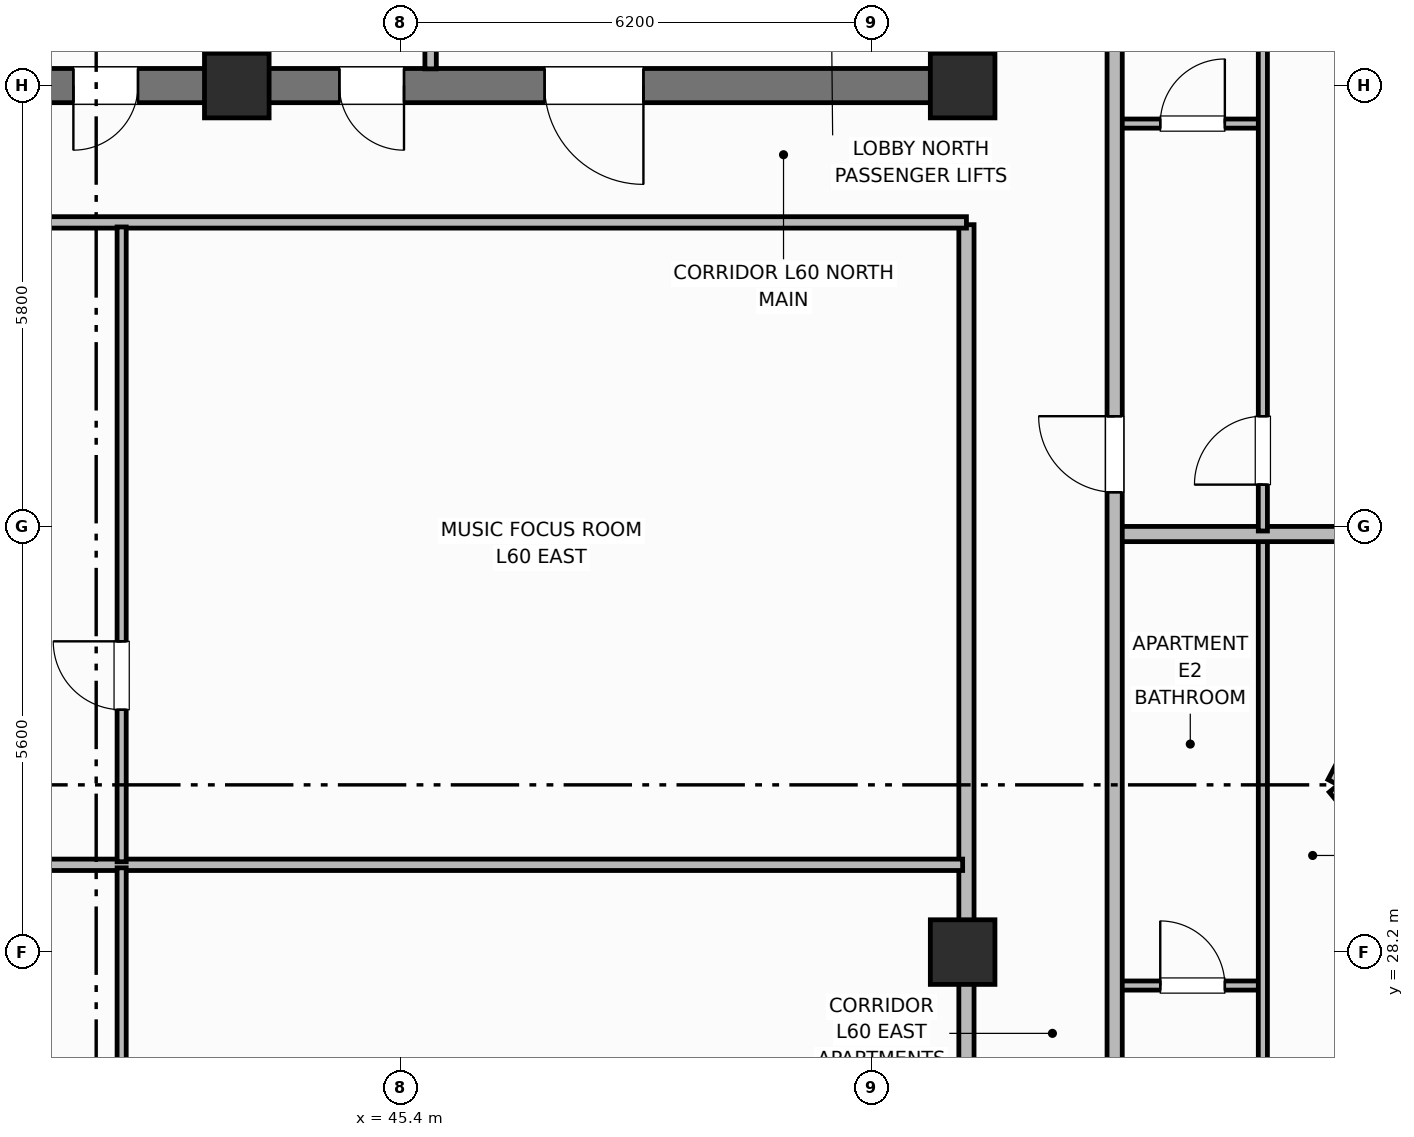
"""IFC4 building model, lengths in metres.
Left out: names, types, materials, properties, quantities, classifications, styles, units other than length and angle.
Written with IfcOpenShell. Run it as: python <this file> out.ifc"""

import sys

from ifc_helpers import new_model, si_unit, direction, frame, frame_2d, origin, origin_2d, place, context, subcontext, project, spatial, rectangle, extrude, element, fill, save


model = new_model("IFC4")
c1 = context("Model", 3, precision=1e-05, world=origin(), true_north=direction((0.0, 1.0)))
c2 = subcontext(c1, "Body", "Model", "MODEL_VIEW")
j1 = project(units=[si_unit("LENGTHUNIT", "METRE"), si_unit("PLANEANGLEUNIT", "RADIAN")], contexts=[c1])
p1 = place(None, origin())
s1 = spatial("IfcSite", under=j1, at=p1, CompositionType="ELEMENT")
p2 = place(p1, origin())
s2 = spatial("IfcBuilding", under=s1, at=p2, CompositionType="ELEMENT")
p3 = place(p2, frame((0.0, 0.0, 240.6)))
s3 = spatial("IfcBuildingStorey", under=s2, at=p3, CompositionType="ELEMENT", Elevation=240.6)
p4 = place(p3, frame((52.8, 39.825, 0.0), z_axis=(0.0, 0.0, 1.0), x_axis=(0.0, 1.0, 0.0)))
e1 = element("IfcWall", 1, at=p4, inside=s3, PredefinedType="SHEAR", context=c2, shape_type="SweptSolid", body=[
    extrude(rectangle(XDim=5.75, YDim=0.45, at=frame_2d((2.875, 0.0))), origin(), (0.0, 0.0, 1.0), 3.7),
])
p5 = place(p3, frame((52.8, 39.6, 0.0), z_axis=(0.0, 0.0, 1.0), x_axis=(-1.0, 0.0, 0.0)))
e2 = element("IfcWall", 2, at=p5, inside=s3, PredefinedType="SHEAR", context=c2, shape_type="SweptSolid", body=[
    extrude(rectangle(XDim=27.2, YDim=0.45, at=frame_2d((13.6, 0.0))), origin(), (0.0, 0.0, 1.0), 3.7),
])
p6 = place(p5, frame((24.3, 0.0, 0.0)))
e3 = element("IfcOpeningElement", 3, at=p6, cuts=e2, PredefinedType="OPENING", context=c2, shape_type="SweptSolid", body=[
    extrude(rectangle(XDim=1.1, YDim=2.15, at=frame_2d((0.55, 1.075))), frame((0.0, 0.235, 0.0), z_axis=(0.0, -1.0, 0.0), x_axis=(1.0, 0.0, 0.0)), (0.0, 0.0, 1.0), 0.47),
])
p7 = place(p5, frame((21.85, 0.0, 0.0)))
e4 = element("IfcOpeningElement", 4, at=p7, cuts=e2, PredefinedType="OPENING", context=c2, shape_type="SweptSolid", body=[
    extrude(rectangle(XDim=0.85, YDim=2.1, at=frame_2d((0.425, 1.05))), frame((0.0, 0.235, 0.0), z_axis=(0.0, -1.0, 0.0), x_axis=(1.0, 0.0, 0.0)), (0.0, 0.0, 1.0), 0.47),
])
p8 = place(p5, frame((19.85, 0.0, 0.0)))
e5 = element("IfcOpeningElement", 5, at=p8, cuts=e2, PredefinedType="OPENING", context=c2, shape_type="SweptSolid", body=[
    extrude(rectangle(XDim=0.85, YDim=2.1, at=frame_2d((0.425, 1.05))), frame((0.0, 0.235, 0.0), z_axis=(0.0, -1.0, 0.0), x_axis=(1.0, 0.0, 0.0)), (0.0, 0.0, 1.0), 0.47),
])
p9 = place(p5, frame((15.1, 0.0, 0.0)))
e6 = element("IfcOpeningElement", 6, at=p9, cuts=e2, PredefinedType="OPENING", context=c2, shape_type="SweptSolid", body=[
    extrude(rectangle(XDim=1.2, YDim=2.15, at=frame_2d((0.6, 1.075))), frame((0.0, 0.235, 0.0), z_axis=(0.0, -1.0, 0.0), x_axis=(1.0, 0.0, 0.0)), (0.0, 0.0, 1.0), 0.47),
])
p10 = place(p5, frame((12.6, 0.0, 0.0)))
e7 = element("IfcOpeningElement", 7, at=p10, cuts=e2, PredefinedType="OPENING", context=c2, shape_type="SweptSolid", body=[
    extrude(rectangle(XDim=0.85, YDim=2.1, at=frame_2d((0.425, 1.05))), frame((0.0, 0.235, 0.0), z_axis=(0.0, -1.0, 0.0), x_axis=(1.0, 0.0, 0.0)), (0.0, 0.0, 1.0), 0.47),
])
p11 = place(p5, frame((10.85, 0.0, 0.0)))
e8 = element("IfcOpeningElement", 8, at=p11, cuts=e2, PredefinedType="OPENING", context=c2, shape_type="SweptSolid", body=[
    extrude(rectangle(XDim=0.85, YDim=2.1, at=frame_2d((0.425, 1.05))), frame((0.0, 0.235, 0.0), z_axis=(0.0, -1.0, 0.0), x_axis=(1.0, 0.0, 0.0)), (0.0, 0.0, 1.0), 0.47),
])
p12 = place(p5, frame((7.35, 0.0, 0.0)))
e9 = element("IfcOpeningElement", 9, at=p12, cuts=e2, PredefinedType="OPENING", context=c2, shape_type="SweptSolid", body=[
    extrude(rectangle(XDim=0.85, YDim=2.1, at=frame_2d((0.425, 1.05))), frame((0.0, 0.235, 0.0), z_axis=(0.0, -1.0, 0.0), x_axis=(1.0, 0.0, 0.0)), (0.0, 0.0, 1.0), 0.47),
])
p13 = place(p5, frame((4.2, 0.0, 0.0)))
e10 = element("IfcOpeningElement", 10, at=p13, cuts=e2, PredefinedType="OPENING", context=c2, shape_type="SweptSolid", body=[
    extrude(rectangle(XDim=1.3, YDim=2.2, at=frame_2d((0.65, 1.1))), frame((0.0, 0.235, 0.0), z_axis=(0.0, -1.0, 0.0), x_axis=(1.0, 0.0, 0.0)), (0.0, 0.0, 1.0), 0.47),
])
p14 = place(p3, frame((43.25, 39.825, 0.0), z_axis=(0.0, 0.0, 1.0), x_axis=(0.0, 1.0, 0.0)))
e11 = element("IfcWall", 11, at=p14, inside=s3, PredefinedType="SHEAR", context=c2, shape_type="SweptSolid", body=[
    extrude(rectangle(XDim=5.75, YDim=0.4, at=frame_2d((2.875, 0.0))), origin(), (0.0, 0.0, 1.0), 3.7),
])
for number, where, z_axis, x_axis in (
    (12, (43.25, 39.6, 0.0), (0.0, 0.0, 1.0), (1.0, 0.0, 0.0)),
    (13, (52.8, 39.6, 0.0), (0.0, 0.0, 1.0), (1.0, 0.0, 0.0)),
    (14, (52.8, 28.2, 0.0), (0.0, 0.0, 1.0), (1.0, 0.0, 0.0)),
):
    element("IfcColumn", number, at=place(p3, frame(where, z_axis=z_axis, x_axis=x_axis)), inside=s3, PredefinedType="COLUMN", context=c2, shape_type="SweptSolid", body=[
        extrude(rectangle(XDim=0.85, YDim=0.85, at=origin_2d()), origin(), (0.0, 0.0, 1.0), 3.7),
    ])
for number, where, z_axis, x_axis in (
    (15, (57.74, 26.0, 0.0), (0.0, 0.0, 1.0), (0.635, 0.773, 0.0)),
    (16, (58.89, 29.0, 0.0), (0.0, 0.0, 1.0), (-0.635, 0.773, 0.0)),
):
    element("IfcWall", number, at=place(p3, frame(where, z_axis=z_axis, x_axis=x_axis)), inside=s3, PredefinedType="SOLIDWALL", context=c2, shape_type="SweptSolid", body=[
        extrude(rectangle(XDim=1.812, YDim=0.3, at=frame_2d((0.906, 0.0))), origin(), (0.0, 0.0, 1.0), 2.73),
    ])
p15 = place(p3, frame((57.74, 30.4, 0.0), z_axis=(0.0, 0.0, 1.0), x_axis=(0.463191013929, 0.88625847506, 0.0)))
e17 = element("IfcWall", 17, at=p15, inside=s3, PredefinedType="SOLIDWALL", context=c2, shape_type="SweptSolid", body=[
    extrude(rectangle(XDim=2.483, YDim=0.3, at=frame_2d((1.241, 0.0))), origin(), (0.0, 0.0, 1.0), 2.73),
])
p16 = place(p15, frame((0.691, 0.0, 0.92)))
e18 = element("IfcOpeningElement", 18, at=p16, cuts=e17, PredefinedType="OPENING", context=c2, shape_type="SweptSolid", body=[
    extrude(rectangle(XDim=1.1, YDim=1.65, at=frame_2d((0.55, 0.825))), frame((0.0, 0.16, 0.0), z_axis=(0.0, -1.0, 0.0), x_axis=(1.0, 0.0, 0.0)), (0.0, 0.0, 1.0), 0.32),
])
for number, where, z_axis, x_axis in (
    (19, (43.05, 39.82, 0.0), (0.0, 0.0, 1.0), (0.0, 1.0, 0.0)),
    (20, (45.8, 39.82, 0.0), (0.0, 0.0, 1.0), (0.0, 1.0, 0.0)),
):
    element("IfcWall", number, at=place(p3, frame(where, z_axis=z_axis, x_axis=x_axis)), inside=s3, PredefinedType="PARTITIONING", context=c2, shape_type="SweptSolid", body=[
        extrude(rectangle(XDim=5.63, YDim=0.15, at=frame_2d((2.815, 0.0))), origin(), (0.0, 0.0, 1.0), 2.56),
    ])
p17 = place(p3, frame((52.85, 18.63, 0.0), z_axis=(0.0, 0.0, 1.0), x_axis=(0.0, 1.0, 0.0)))
e21 = element("IfcWall", 21, at=p17, inside=s3, PredefinedType="PARTITIONING", context=c2, shape_type="SweptSolid", body=[
    extrude(rectangle(XDim=19.14, YDim=0.2, at=frame_2d((9.57, 0.0))), origin(), (0.0, 0.0, 1.0), 2.56),
])
p18 = place(p3, frame((30.7, 37.8, 0.0), z_axis=(0.0, 0.0, 1.0), x_axis=(1.0, 0.0, 0.0)))
e22 = element("IfcWall", 22, at=p18, inside=s3, PredefinedType="PARTITIONING", context=c2, shape_type="SweptSolid", body=[
    extrude(rectangle(XDim=22.15, YDim=0.15, at=frame_2d((11.075, 0.0))), origin(), (0.0, 0.0, 1.0), 2.56),
])
p19 = place(p3, frame((30.73, 29.348, 0.0), z_axis=(0.0, 0.0, 1.0), x_axis=(1.0, 0.0, 0.0)))
e23 = element("IfcWall", 23, at=p19, inside=s3, PredefinedType="PARTITIONING", context=c2, shape_type="SweptSolid", body=[
    extrude(rectangle(XDim=22.07, YDim=0.15, at=frame_2d((11.035, 0.0))), origin(), (0.0, 0.0, 1.0), 2.56),
])
p20 = place(p3, frame((41.735, 18.66, 0.0), z_axis=(0.0, 0.0, 1.0), x_axis=(0.0, 1.0, 0.0)))
e24 = element("IfcWall", 24, at=p20, inside=s3, PredefinedType="PARTITIONING", context=c2, shape_type="SweptSolid", body=[
    extrude(rectangle(XDim=10.648, YDim=0.12, at=frame_2d((5.324, 0.0))), origin(), (0.0, 0.0, 1.0), 2.56),
])
p21 = place(p20, frame((2.0, 0.0, 0.0)))
e25 = element("IfcOpeningElement", 25, at=p21, cuts=e24, PredefinedType="OPENING", context=c2, shape_type="SweptSolid", body=[
    extrude(rectangle(XDim=0.9, YDim=2.1, at=frame_2d((0.45, 1.05))), frame((0.0, 0.07, 0.0), z_axis=(0.0, -1.0, 0.0), x_axis=(1.0, 0.0, 0.0)), (0.0, 0.0, 1.0), 0.14),
])
p22 = place(p3, frame((41.735, 29.388, 0.0), z_axis=(0.0, 0.0, 1.0), x_axis=(0.0, 1.0, 0.0)))
e26 = element("IfcWall", 26, at=p22, inside=s3, PredefinedType="PARTITIONING", context=c2, shape_type="SweptSolid", body=[
    extrude(rectangle(XDim=8.352, YDim=0.12, at=frame_2d((4.176, 0.0))), origin(), (0.0, 0.0, 1.0), 2.56),
])
p23 = place(p22, frame((2.0, 0.0, 0.0)))
e27 = element("IfcOpeningElement", 27, at=p23, cuts=e26, PredefinedType="OPENING", context=c2, shape_type="SweptSolid", body=[
    extrude(rectangle(XDim=0.9, YDim=2.1, at=frame_2d((0.45, 1.05))), frame((0.0, 0.07, 0.0), z_axis=(0.0, -1.0, 0.0), x_axis=(1.0, 0.0, 0.0)), (0.0, 0.0, 1.0), 0.14),
])
p24 = place(p3, frame((54.8, 27.76, 0.0), z_axis=(0.0, 0.0, 1.0), x_axis=(1.0, 0.0, 0.0)))
e28 = element("IfcWall", 28, at=p24, inside=s3, PredefinedType="PARTITIONING", context=c2, shape_type="SweptSolid", body=[
    extrude(rectangle(XDim=1.95, YDim=0.12, at=frame_2d((0.975, 0.0))), origin(), (0.0, 0.0, 1.0), 2.56),
])
p25 = place(p24, frame((0.6, 0.0, 0.0)))
e29 = element("IfcOpeningElement", 29, at=p25, cuts=e28, PredefinedType="OPENING", context=c2, shape_type="SweptSolid", body=[
    extrude(rectangle(XDim=0.85, YDim=2.1, at=frame_2d((0.425, 1.05))), frame((0.0, 0.07, 0.0), z_axis=(0.0, -1.0, 0.0), x_axis=(1.0, 0.0, 0.0)), (0.0, 0.0, 1.0), 0.14),
])
p26 = place(p3, frame((56.75, 22.4, 0.0), z_axis=(0.0, 0.0, 1.0), x_axis=(0.0, 1.0, 0.0)))
e30 = element("IfcWall", 30, at=p26, inside=s3, PredefinedType="PARTITIONING", context=c2, shape_type="SweptSolid", body=[
    extrude(rectangle(XDim=11.26, YDim=0.12, at=frame_2d((5.63, 0.0))), origin(), (0.0, 0.0, 1.0), 2.56),
])
p27 = place(p26, frame((0.61, 0.0, 0.0)))
e31 = element("IfcOpeningElement", 31, at=p27, cuts=e30, PredefinedType="OPENING", context=c2, shape_type="SweptSolid", body=[
    extrude(rectangle(XDim=0.9, YDim=2.1, at=frame_2d((0.45, 1.05))), frame((0.0, 0.07, 0.0), z_axis=(0.0, -1.0, 0.0), x_axis=(1.0, 0.0, 0.0)), (0.0, 0.0, 1.0), 0.14),
])
p28 = place(p3, frame((54.8, 33.7, 0.0), z_axis=(0.0, 0.0, 1.0), x_axis=(1.0, 0.0, 0.0)))
e32 = element("IfcWall", 32, at=p28, inside=s3, PredefinedType="PARTITIONING", context=c2, shape_type="SweptSolid", body=[
    extrude(rectangle(XDim=4.07, YDim=0.2, at=frame_2d((2.035, 0.0))), origin(), (0.0, 0.0, 1.0), 2.56),
])
p29 = place(p3, frame((54.8, 39.1, 0.0), z_axis=(0.0, 0.0, 1.0), x_axis=(1.0, 0.0, 0.0)))
e33 = element("IfcWall", 33, at=p29, inside=s3, PredefinedType="PARTITIONING", context=c2, shape_type="SweptSolid", body=[
    extrude(rectangle(XDim=1.95, YDim=0.12, at=frame_2d((0.975, 0.0))), origin(), (0.0, 0.0, 1.0), 2.56),
])
p30 = place(p29, frame((0.6, 0.0, 0.0)))
e34 = element("IfcOpeningElement", 34, at=p30, cuts=e33, PredefinedType="OPENING", context=c2, shape_type="SweptSolid", body=[
    extrude(rectangle(XDim=0.85, YDim=2.1, at=frame_2d((0.425, 1.05))), frame((0.0, 0.07, 0.0), z_axis=(0.0, -1.0, 0.0), x_axis=(1.0, 0.0, 0.0)), (0.0, 0.0, 1.0), 0.14),
])
p31 = place(p3, frame((56.75, 33.74, 0.0), z_axis=(0.0, 0.0, 1.0), x_axis=(0.0, 1.0, 0.0)))
e35 = element("IfcWall", 35, at=p31, inside=s3, PredefinedType="PARTITIONING", context=c2, shape_type="SweptSolid", body=[
    extrude(rectangle(XDim=12.67, YDim=0.12, at=frame_2d((6.335, 0.0))), origin(), (0.0, 0.0, 1.0), 2.56),
])
p32 = place(p31, frame((0.61, 0.0, 0.0)))
e36 = element("IfcOpeningElement", 36, at=p32, cuts=e35, PredefinedType="OPENING", context=c2, shape_type="SweptSolid", body=[
    extrude(rectangle(XDim=0.9, YDim=2.1, at=frame_2d((0.45, 1.05))), frame((0.0, 0.07, 0.0), z_axis=(0.0, -1.0, 0.0), x_axis=(1.0, 0.0, 0.0)), (0.0, 0.0, 1.0), 0.14),
])
p33 = place(p31, frame((10.51, 0.0, 0.0)))
e37 = element("IfcOpeningElement", 37, at=p33, cuts=e35, PredefinedType="OPENING", context=c2, shape_type="SweptSolid", body=[
    extrude(rectangle(XDim=0.82, YDim=2.08, at=frame_2d((0.41, 1.04))), frame((0.0, 0.07, 0.0), z_axis=(0.0, -1.0, 0.0), x_axis=(1.0, 0.0, 0.0)), (0.0, 0.0, 1.0), 0.14),
])
p34 = place(p3, frame((54.8, 9.95, 0.0), z_axis=(0.0, 0.0, 1.0), x_axis=(0.0, 1.0, 0.0)))
e38 = element("IfcWall", 38, at=p34, inside=s3, PredefinedType="PARTITIONING", context=c2, shape_type="SweptSolid", body=[
    extrude(rectangle(XDim=36.5, YDim=0.2, at=frame_2d((18.25, 0.0))), origin(), (0.0, 0.0, 1.0), 2.56),
])
p35 = place(p34, frame((3.25, 0.0, 0.0)))
e39 = element("IfcOpeningElement", 39, at=p35, cuts=e38, PredefinedType="OPENING", context=c2, shape_type="SweptSolid", body=[
    extrude(rectangle(XDim=1.0, YDim=2.15, at=frame_2d((0.5, 1.075))), frame((0.0, 0.11, 0.0), z_axis=(0.0, -1.0, 0.0), x_axis=(1.0, 0.0, 0.0)), (0.0, 0.0, 1.0), 0.22),
])
p36 = place(p34, frame((12.96, 0.0, 0.0)))
e40 = element("IfcOpeningElement", 40, at=p36, cuts=e38, PredefinedType="OPENING", context=c2, shape_type="SweptSolid", body=[
    extrude(rectangle(XDim=1.0, YDim=2.15, at=frame_2d((0.5, 1.075))), frame((0.0, 0.11, 0.0), z_axis=(0.0, -1.0, 0.0), x_axis=(1.0, 0.0, 0.0)), (0.0, 0.0, 1.0), 0.22),
])
p37 = place(p34, frame((24.3, 0.0, 0.0)))
e41 = element("IfcOpeningElement", 41, at=p37, cuts=e38, PredefinedType="OPENING", context=c2, shape_type="SweptSolid", body=[
    extrude(rectangle(XDim=1.0, YDim=2.15, at=frame_2d((0.5, 1.075))), frame((0.0, 0.11, 0.0), z_axis=(0.0, -1.0, 0.0), x_axis=(1.0, 0.0, 0.0)), (0.0, 0.0, 1.0), 0.22),
])
p38 = place(p23, origin())
e42 = element("IfcDoor", 42, at=p38, inside=s3, OperationType="SINGLE_SWING_RIGHT", PredefinedType="DOOR", context=c2, shape_type="SweptSolid", body=[
    extrude(rectangle(XDim=0.9, YDim=2.1, at=frame_2d((0.45, 1.05))), frame((0.0, 0.025, 0.0), z_axis=(0.0, -1.0, 0.0), x_axis=(1.0, 0.0, 0.0)), (0.0, 0.0, 1.0), 0.05),
])
fill(e27, e42)
p39 = place(p25, origin())
e43 = element("IfcDoor", 43, at=p39, inside=s3, OperationType="SINGLE_SWING_LEFT", PredefinedType="DOOR", context=c2, shape_type="SweptSolid", body=[
    extrude(rectangle(XDim=0.85, YDim=2.1, at=frame_2d((0.425, 1.05))), frame((0.0, 0.025, 0.0), z_axis=(0.0, -1.0, 0.0), x_axis=(1.0, 0.0, 0.0)), (0.0, 0.0, 1.0), 0.05),
])
fill(e29, e43)
p40 = place(p30, origin())
e44 = element("IfcDoor", 44, at=p40, inside=s3, OperationType="SINGLE_SWING_RIGHT", PredefinedType="DOOR", context=c2, shape_type="SweptSolid", body=[
    extrude(rectangle(XDim=0.85, YDim=2.1, at=frame_2d((0.425, 1.05))), frame((0.0, 0.025, 0.0), z_axis=(0.0, -1.0, 0.0), x_axis=(1.0, 0.0, 0.0)), (0.0, 0.0, 1.0), 0.05),
])
fill(e34, e44)
p41 = place(p32, origin())
e45 = element("IfcDoor", 45, at=p41, inside=s3, OperationType="SINGLE_SWING_LEFT", PredefinedType="DOOR", context=c2, shape_type="SweptSolid", body=[
    extrude(rectangle(XDim=0.9, YDim=2.1, at=frame_2d((0.45, 1.05))), frame((0.0, 0.025, 0.0), z_axis=(0.0, -1.0, 0.0), x_axis=(1.0, 0.0, 0.0)), (0.0, 0.0, 1.0), 0.05),
])
fill(e36, e45)
p42 = place(p37, origin())
e46 = element("IfcDoor", 46, at=p42, inside=s3, OperationType="SINGLE_SWING_RIGHT", PredefinedType="DOOR", context=c2, shape_type="SweptSolid", body=[
    extrude(rectangle(XDim=1.0, YDim=2.15, at=frame_2d((0.5, 1.075))), frame((0.0, 0.025, 0.0), z_axis=(0.0, -1.0, 0.0), x_axis=(1.0, 0.0, 0.0)), (0.0, 0.0, 1.0), 0.05),
])
fill(e41, e46)
p43 = place(p11, origin())
e47 = element("IfcDoor", 47, at=p43, inside=s3, OperationType="SINGLE_SWING_RIGHT", PredefinedType="DOOR", context=c2, shape_type="SweptSolid", body=[
    extrude(rectangle(XDim=0.85, YDim=2.1, at=frame_2d((0.425, 1.05))), frame((0.0, 0.025, 0.0), z_axis=(0.0, -1.0, 0.0), x_axis=(1.0, 0.0, 0.0)), (0.0, 0.0, 1.0), 0.05),
])
fill(e8, e47)
p44 = place(p12, origin())
e48 = element("IfcDoor", 48, at=p44, inside=s3, OperationType="SINGLE_SWING_LEFT", PredefinedType="DOOR", context=c2, shape_type="SweptSolid", body=[
    extrude(rectangle(XDim=0.85, YDim=2.1, at=frame_2d((0.425, 1.05))), frame((0.0, 0.025, 0.0), z_axis=(0.0, -1.0, 0.0), x_axis=(1.0, 0.0, 0.0)), (0.0, 0.0, 1.0), 0.05),
])
fill(e9, e48)
p45 = place(p13, origin())
e49 = element("IfcDoor", 49, at=p45, inside=s3, OperationType="SINGLE_SWING_LEFT", PredefinedType="DOOR", context=c2, shape_type="SweptSolid", body=[
    extrude(rectangle(XDim=1.3, YDim=2.2, at=frame_2d((0.65, 1.1))), frame((0.0, 0.025, 0.0), z_axis=(0.0, -1.0, 0.0), x_axis=(1.0, 0.0, 0.0)), (0.0, 0.0, 1.0), 0.05),
])
fill(e10, e49)
save(model, sys.argv[1])
